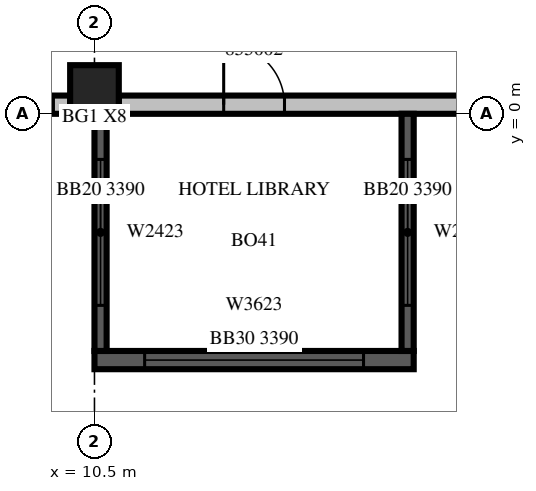
"""IFC4 building model, lengths in metres.
Left out: names, types, materials, properties, quantities, classifications, styles, units other than length and angle.
Written with IfcOpenShell. Run it as: python <this file> out.ifc"""

import sys

from ifc_helpers import new_model, si_unit, direction, frame, frame_2d, origin, origin_2d, place, context, subcontext, project, spatial, rectangle, extrude, source, transform, mapped, element, fill, save


model = new_model("IFC4")
c1 = context("Model", 3, precision=1e-05, world=origin(), true_north=direction((0.0, 1.0)))
c2 = subcontext(c1, "Body", "Model", "MODEL_VIEW")
j1 = project(units=[si_unit("LENGTHUNIT", "METRE"), si_unit("PLANEANGLEUNIT", "RADIAN")], contexts=[c1])
p1 = place(None, origin())
s1 = spatial("IfcSite", under=j1, at=p1, CompositionType="ELEMENT")
p2 = place(p1, origin())
s2 = spatial("IfcBuilding", under=s1, at=p2, CompositionType="ELEMENT")
p3 = place(p2, frame((0.0, 0.0, 242.4)))
s3 = spatial("IfcBuildingStorey", under=s2, at=p3, CompositionType="ELEMENT", Elevation=242.4)
m1 = source(origin(), c2, "Body", "SweptSolid", [
    extrude(rectangle(XDim=0.8, YDim=0.8, at=origin_2d()), origin(), (0.0, 0.0, 1.0), 3.8),
])
p4 = place(p3, frame((10.5, 0.4, 0.0), z_axis=(0.0, 0.0, 1.0), x_axis=(1.0, 0.0, 0.0)))
e1 = element("IfcColumn", 1, at=p4, inside=s3, PredefinedType="COLUMN", context=c2, shape_type="MappedRepresentation", body=[
    mapped(m1, transform((0.0, 0.0, 0.0), scale=1.0)),
])
m2 = source(origin(), c2, "Body", "SweptSolid", [
    extrude(rectangle(XDim=5.9, YDim=0.3, at=frame_2d((2.95, 0.0))), origin(), (0.0, 0.0, 1.0), 3.4),
])
p5 = place(p3, frame((4.2, 0.15, 0.0), z_axis=(0.0, 0.0, 1.0), x_axis=(1.0, 0.0, 0.0)))
e2 = element("IfcWall", 2, at=p5, inside=s3, PredefinedType="STANDARD", context=c2, shape_type="MappedRepresentation", body=[
    mapped(m2, transform((0.0, 0.0, 0.0), scale=1.0)),
])
m3 = source(origin(), c2, "Body", "SweptSolid", [
    extrude(rectangle(XDim=1.8, YDim=2.3, at=frame_2d((0.9, 1.15))), frame((0.0, 0.16, 0.0), z_axis=(0.0, -1.0, 0.0), x_axis=(1.0, 0.0, 0.0)), (0.0, 0.0, 1.0), 0.32),
])
p6 = place(p5, frame((0.675, 0.0, 0.6)))
e3 = element("IfcOpeningElement", 3, at=p6, cuts=e2, PredefinedType="OPENING", context=c2, shape_type="MappedRepresentation", body=[
    mapped(m3, transform((0.0, 0.0, 0.0), scale=1.0)),
])
p7 = place(p5, frame((3.825, 0.0, 0.6)))
e4 = element("IfcOpeningElement", 4, at=p7, cuts=e2, PredefinedType="OPENING", context=c2, shape_type="MappedRepresentation", body=[
    mapped(m3, transform((0.0, 0.0, 0.0), scale=1.0)),
])
m4 = source(origin(), c2, "Body", "SweptSolid", [
    extrude(rectangle(XDim=9.7, YDim=0.3, at=frame_2d((4.85, 0.0))), origin(), (0.0, 0.0, 1.0), 3.4),
])
p8 = place(p3, frame((10.9, 0.15, 0.0), z_axis=(0.0, 0.0, 1.0), x_axis=(1.0, 0.0, 0.0)))
e5 = element("IfcWall", 5, at=p8, inside=s3, PredefinedType="STANDARD", context=c2, shape_type="MappedRepresentation", body=[
    mapped(m4, transform((0.0, 0.0, 0.0), scale=1.0)),
])
m5 = source(origin(), c2, "Body", "SweptSolid", [
    extrude(rectangle(XDim=3.6, YDim=2.3, at=frame_2d((1.8, 1.15))), frame((0.0, 0.16, 0.0), z_axis=(0.0, -1.0, 0.0), x_axis=(1.0, 0.0, 0.0)), (0.0, 0.0, 1.0), 0.32),
])
p9 = place(p8, frame((5.675, 0.0, 0.6)))
e6 = element("IfcOpeningElement", 6, at=p9, cuts=e5, PredefinedType="OPENING", context=c2, shape_type="MappedRepresentation", body=[
    mapped(m5, transform((0.0, 0.0, 0.0), scale=1.0)),
])
m6 = source(origin(), c2, "Body", "SweptSolid", [
    extrude(rectangle(XDim=1.0, YDim=2.1, at=frame_2d((0.5, 1.05))), frame((0.0, 0.16, 0.0), z_axis=(0.0, -1.0, 0.0), x_axis=(1.0, 0.0, 0.0)), (0.0, 0.0, 1.0), 0.32),
])
p10 = place(p8, frame((1.725, 0.0, 0.0)))
e7 = element("IfcOpeningElement", 7, at=p10, cuts=e5, PredefinedType="OPENING", context=c2, shape_type="MappedRepresentation", body=[
    mapped(m6, transform((0.0, 0.0, 0.0), scale=1.0)),
])
m7 = source(origin(), c2, "Body", "SweptSolid", [
    extrude(rectangle(XDim=5.25, YDim=0.3, at=frame_2d((2.625, 0.0))), origin(), (0.0, 0.0, 1.0), 3.39),
])
p11 = place(p3, frame((10.5, -4.05, 0.0), z_axis=(0.0, 0.0, 1.0), x_axis=(1.0, 0.0, 0.0)))
e8 = element("IfcWall", 8, at=p11, inside=s3, PredefinedType="SOLIDWALL", context=c2, shape_type="MappedRepresentation", body=[
    mapped(m7, transform((0.0, 0.0, 0.0), scale=1.0)),
])
p12 = place(p11, frame((0.825, 0.0, 0.6)))
e9 = element("IfcOpeningElement", 9, at=p12, cuts=e8, PredefinedType="OPENING", context=c2, shape_type="MappedRepresentation", body=[
    mapped(m5, transform((0.0, 0.0, 0.0), scale=1.0)),
])
m8 = source(origin(), c2, "Body", "SweptSolid", [
    extrude(rectangle(XDim=3.9, YDim=0.2, at=frame_2d((1.95, 0.0))), origin(), (0.0, 0.0, 1.0), 3.39),
])
p13 = place(p3, frame((10.6, 0.0, 0.0), z_axis=(0.0, 0.0, 1.0), x_axis=(0.0, -1.0, 0.0)))
e10 = element("IfcWall", 10, at=p13, inside=s3, PredefinedType="SOLIDWALL", context=c2, shape_type="MappedRepresentation", body=[
    mapped(m8, transform((0.0, 0.0, 0.0), scale=1.0)),
])
m9 = source(origin(), c2, "Body", "SweptSolid", [
    extrude(rectangle(XDim=2.4, YDim=2.3, at=frame_2d((1.2, 1.15))), frame((0.0, 0.11, 0.0), z_axis=(0.0, -1.0, 0.0), x_axis=(1.0, 0.0, 0.0)), (0.0, 0.0, 1.0), 0.22),
])
p14 = place(p13, frame((0.75, 0.0, 0.6)))
e11 = element("IfcOpeningElement", 11, at=p14, cuts=e10, PredefinedType="OPENING", context=c2, shape_type="MappedRepresentation", body=[
    mapped(m9, transform((0.0, 0.0, 0.0), scale=1.0)),
])
p15 = place(p3, frame((15.65, 0.0, 0.0), z_axis=(0.0, 0.0, 1.0), x_axis=(0.0, -1.0, 0.0)))
e12 = element("IfcWall", 12, at=p15, inside=s3, PredefinedType="SOLIDWALL", context=c2, shape_type="MappedRepresentation", body=[
    mapped(m8, transform((0.0, 0.0, 0.0), scale=1.0)),
])
p16 = place(p15, frame((0.75, 0.0, 0.6)))
e13 = element("IfcOpeningElement", 13, at=p16, cuts=e12, PredefinedType="OPENING", context=c2, shape_type="MappedRepresentation", body=[
    mapped(m9, transform((0.0, 0.0, 0.0), scale=1.0)),
])
m10 = source(origin(), c2, "Body", "SweptSolid", [
    extrude(rectangle(XDim=1.8, YDim=2.3, at=frame_2d((0.9, 1.15))), frame((0.0, 0.03, 0.0), z_axis=(0.0, -1.0, 0.0), x_axis=(1.0, 0.0, 0.0)), (0.0, 0.0, 1.0), 0.06),
])
p17 = place(p7, origin())
e14 = element("IfcWindow", 14, at=p17, inside=s3, PartitioningType="SINGLE_PANEL", PredefinedType="WINDOW", context=c2, shape_type="MappedRepresentation", body=[
    mapped(m10, transform((0.0, 0.0, 0.0), scale=1.0)),
])
fill(e4, e14)
m11 = source(origin(), c2, "Body", "SweptSolid", [
    extrude(rectangle(XDim=3.6, YDim=2.3, at=frame_2d((1.8, 1.15))), frame((0.0, 0.03, 0.0), z_axis=(0.0, -1.0, 0.0), x_axis=(1.0, 0.0, 0.0)), (0.0, 0.0, 1.0), 0.06),
])
p18 = place(p12, origin())
e15 = element("IfcWindow", 15, at=p18, inside=s3, PartitioningType="SINGLE_PANEL", PredefinedType="WINDOW", context=c2, shape_type="MappedRepresentation", body=[
    mapped(m11, transform((0.0, 0.0, 0.0), scale=1.0)),
])
fill(e9, e15)
m12 = source(origin(), c2, "Body", "SweptSolid", [
    extrude(rectangle(XDim=2.4, YDim=2.3, at=frame_2d((1.2, 1.15))), frame((0.0, 0.03, 0.0), z_axis=(0.0, -1.0, 0.0), x_axis=(1.0, 0.0, 0.0)), (0.0, 0.0, 1.0), 0.06),
])
p19 = place(p14, origin())
e16 = element("IfcWindow", 16, at=p19, inside=s3, PartitioningType="SINGLE_PANEL", PredefinedType="WINDOW", context=c2, shape_type="MappedRepresentation", body=[
    mapped(m12, transform((0.0, 0.0, 0.0), scale=1.0)),
])
fill(e11, e16)
p20 = place(p16, origin())
e17 = element("IfcWindow", 17, at=p20, inside=s3, PartitioningType="SINGLE_PANEL", PredefinedType="WINDOW", context=c2, shape_type="MappedRepresentation", body=[
    mapped(m12, transform((0.0, 0.0, 0.0), scale=1.0)),
])
fill(e13, e17)
m13 = source(origin(), c2, "Body", "SweptSolid", [
    extrude(rectangle(XDim=1.0, YDim=2.1, at=frame_2d((0.5, 1.05))), frame((0.0, 0.025, 0.0), z_axis=(0.0, -1.0, 0.0), x_axis=(1.0, 0.0, 0.0)), (0.0, 0.0, 1.0), 0.05),
])
p21 = place(p10, origin())
e18 = element("IfcDoor", 18, at=p21, inside=s3, OperationType="SINGLE_SWING_LEFT", PredefinedType="DOOR", context=c2, shape_type="MappedRepresentation", body=[
    mapped(m13, transform((0.0, 0.0, 0.0), scale=1.0)),
])
fill(e7, e18)
save(model, sys.argv[1])
